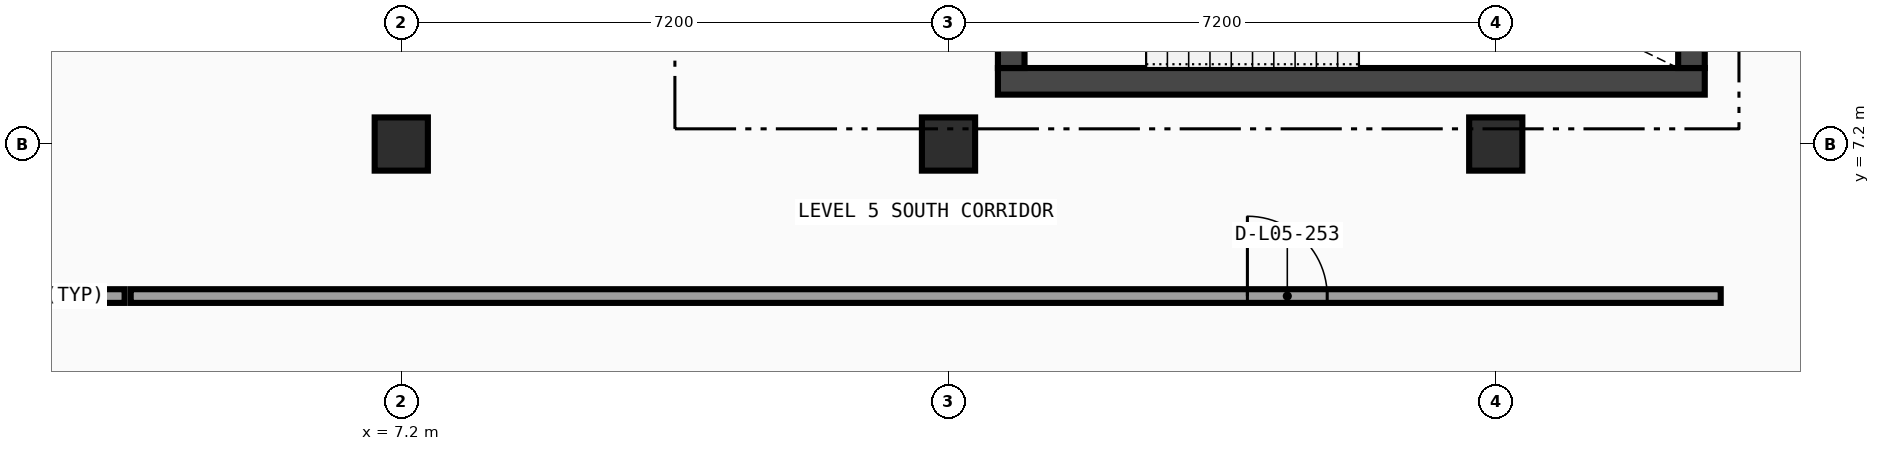
"""IFC4 building model, lengths in metres.
Left out: names, types, materials, properties, quantities, classifications, styles, units other than length and angle.
Written with IfcOpenShell. Run it as: python <this file> out.ifc"""

import sys

from ifc_helpers import new_model, si_unit, direction, frame, frame_2d, origin, origin_2d, place, context, subcontext, project, spatial, rectangle, extrude, element, fill, save


model = new_model("IFC4")
c1 = context("Model", 3, precision=1e-05, world=origin(), true_north=direction((0.0, 1.0)))
c2 = subcontext(c1, "Body", "Model", "MODEL_VIEW")
j1 = project(units=[si_unit("LENGTHUNIT", "METRE"), si_unit("PLANEANGLEUNIT", "RADIAN")], contexts=[c1])
p1 = place(None, origin())
s1 = spatial("IfcSite", under=j1, at=p1, CompositionType="ELEMENT")
p2 = place(p1, origin())
s2 = spatial("IfcBuilding", under=s1, at=p2, CompositionType="ELEMENT")
p3 = place(p2, frame((0.0, 0.0, 22.95)))
s3 = spatial("IfcBuildingStorey", under=s2, at=p3, CompositionType="ELEMENT", Elevation=22.95)
for number, where, z_axis, x_axis in (
    (1, (7.2, 7.2, 0.0), (0.0, 0.0, 1.0), (1.0, 0.0, 0.0)),
    (2, (14.4, 7.2, 0.0), (0.0, 0.0, 1.0), (1.0, 0.0, 0.0)),
    (3, (21.6, 7.2, 0.0), (0.0, 0.0, 1.0), (1.0, 0.0, 0.0)),
):
    element("IfcColumn", number, at=place(p3, frame(where, z_axis=z_axis, x_axis=x_axis)), inside=s3, PredefinedType="COLUMN", context=c2, shape_type="SweptSolid", body=[
        extrude(rectangle(XDim=0.7, YDim=0.7, at=origin_2d()), origin(), (0.0, 0.0, 1.0), 4.05),
    ])
p4 = place(p3, frame((15.05, 8.025, 0.0), z_axis=(0.0, 0.0, 1.0), x_axis=(1.0, 0.0, 0.0)))
e4 = element("IfcWall", 4, at=p4, inside=s3, PredefinedType="SHEAR", context=c2, shape_type="SweptSolid", body=[
    extrude(rectangle(XDim=9.3, YDim=0.35, at=frame_2d((4.65, 0.0))), origin(), (0.0, 0.0, 1.0), 3.8),
])
p5 = place(p3, frame((15.225, 11.6, 0.0), z_axis=(0.0, 0.0, 1.0), x_axis=(0.0, -1.0, 0.0)))
e5 = element("IfcWall", 5, at=p5, inside=s3, PredefinedType="SHEAR", context=c2, shape_type="SweptSolid", body=[
    extrude(rectangle(XDim=3.4, YDim=0.35, at=frame_2d((1.7, 0.0))), origin(), (0.0, 0.0, 1.0), 3.8),
])
p6 = place(p5, frame((1.125, 0.0, 0.0)))
e6 = element("IfcOpeningElement", 6, at=p6, cuts=e5, PredefinedType="OPENING", context=c2, shape_type="SweptSolid", body=[
    extrude(rectangle(XDim=1.15, YDim=2.1, at=frame_2d((0.575, 1.05))), frame((0.0, 0.185, 0.0), z_axis=(0.0, -1.0, 0.0), x_axis=(1.0, 0.0, 0.0)), (0.0, 0.0, 1.0), 0.37),
])
p7 = place(p3, frame((24.175, 8.2, 0.0), z_axis=(0.0, 0.0, 1.0), x_axis=(0.0, 1.0, 0.0)))
e7 = element("IfcWall", 7, at=p7, inside=s3, PredefinedType="SHEAR", context=c2, shape_type="SweptSolid", body=[
    extrude(rectangle(XDim=3.4, YDim=0.35, at=frame_2d((1.7, 0.0))), origin(), (0.0, 0.0, 1.0), 3.8),
])
p8 = place(p3, frame((1.64, 5.2, 0.0), z_axis=(0.0, 0.0, 1.0), x_axis=(1.0, 0.0, 0.0)))
e8 = element("IfcWall", 8, at=p8, inside=s3, PredefinedType="PARTITIONING", context=c2, shape_type="SweptSolid", body=[
    extrude(rectangle(XDim=1.92, YDim=0.18, at=frame_2d((0.96, 0.0))), origin(), (0.0, 0.0, 1.0), 3.8),
])
p9 = place(p3, frame((3.64, 5.2, 0.0), z_axis=(0.0, 0.0, 1.0), x_axis=(1.0, 0.0, 0.0)))
e9 = element("IfcWall", 9, at=p9, inside=s3, PredefinedType="PARTITIONING", context=c2, shape_type="SweptSolid", body=[
    extrude(rectangle(XDim=20.92, YDim=0.18, at=frame_2d((10.46, 0.0))), origin(), (0.0, 0.0, 1.0), 3.206),
])
p10 = place(p9, frame((14.692, 0.0, 0.0)))
e10 = element("IfcOpeningElement", 10, at=p10, cuts=e9, PredefinedType="OPENING", context=c2, shape_type="SweptSolid", body=[
    extrude(rectangle(XDim=1.05, YDim=2.15, at=frame_2d((0.525, 1.075))), frame((0.0, 0.1, 0.0), z_axis=(0.0, -1.0, 0.0), x_axis=(1.0, 0.0, 0.0)), (0.0, 0.0, 1.0), 0.2),
])
p11 = place(p10, origin())
e11 = element("IfcDoor", 11, at=p11, inside=s3, OperationType="SINGLE_SWING_LEFT", PredefinedType="DOOR", context=c2, shape_type="SweptSolid", body=[
    extrude(rectangle(XDim=1.05, YDim=2.15, at=frame_2d((0.525, 1.075))), frame((0.0, 0.025, 0.0), z_axis=(0.0, -1.0, 0.0), x_axis=(1.0, 0.0, 0.0)), (0.0, 0.0, 1.0), 0.05),
])
fill(e10, e11)
save(model, sys.argv[1])
